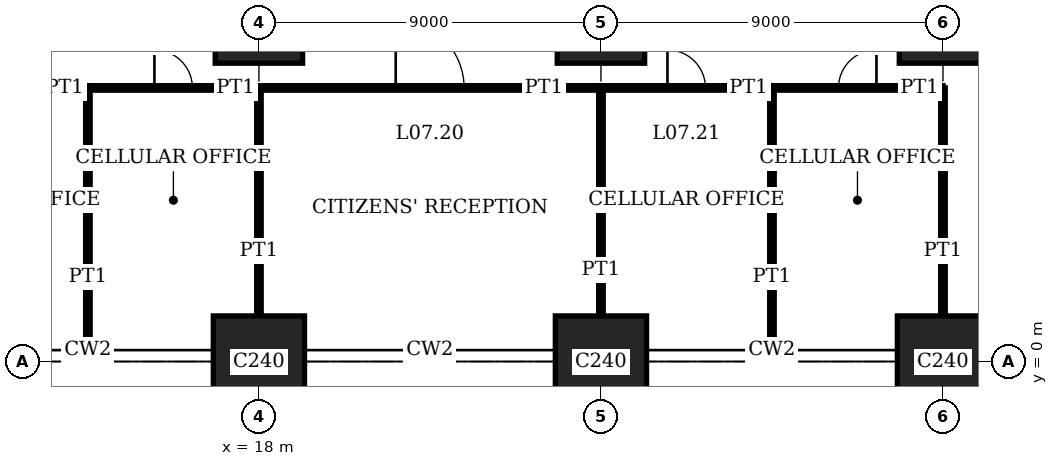
"""IFC4 building model, lengths in metres.
Left out: names, types, materials, properties, quantities, classifications, styles, units other than length and angle.
Written with IfcOpenShell. Run it as: python <this file> out.ifc"""

import sys

from ifc_helpers import new_model, si_unit, direction, frame, frame_2d, origin, origin_2d, place, context, subcontext, project, spatial, rectangle, extrude, element, fill, save


model = new_model("IFC4")
c1 = context("Model", 3, precision=1e-05, world=origin(), true_north=direction((0.0, 1.0)))
c2 = subcontext(c1, "Body", "Model", "MODEL_VIEW")
j1 = project(units=[si_unit("LENGTHUNIT", "METRE"), si_unit("PLANEANGLEUNIT", "RADIAN")], contexts=[c1])
p1 = place(None, origin())
s1 = spatial("IfcSite", under=j1, at=p1, CompositionType="ELEMENT")
p2 = place(p1, origin())
s2 = spatial("IfcBuilding", under=s1, at=p2, CompositionType="ELEMENT")
p3 = place(p2, frame((0.0, 0.0, 31.8)))
s3 = spatial("IfcBuildingStorey", under=s2, at=p3, CompositionType="ELEMENT", Elevation=31.8)
p4 = place(p3, frame((18.0, 0.0, 0.0), z_axis=(0.0, 0.0, 1.0), x_axis=(1.0, 0.0, 0.0)))
e1 = element("IfcColumn", 1, at=p4, inside=s3, PredefinedType="COLUMN", context=c2, shape_type="SweptSolid", body=[
    extrude(rectangle(XDim=2.4, YDim=2.4, at=origin_2d()), origin(), (0.0, 0.0, 1.0), 4.0),
])
p5 = place(p3, frame((18.0, 9.0, 0.0), z_axis=(0.0, 0.0, 1.0), x_axis=(1.0, 0.0, 0.0)))
e2 = element("IfcColumn", 2, at=p5, inside=s3, PredefinedType="COLUMN", context=c2, shape_type="SweptSolid", body=[
    extrude(rectangle(XDim=2.3, YDim=2.3, at=origin_2d()), origin(), (0.0, 0.0, 1.0), 4.0),
])
p6 = place(p3, frame((27.0, 0.0, 0.0), z_axis=(0.0, 0.0, 1.0), x_axis=(1.0, 0.0, 0.0)))
e3 = element("IfcColumn", 3, at=p6, inside=s3, PredefinedType="COLUMN", context=c2, shape_type="SweptSolid", body=[
    extrude(rectangle(XDim=2.4, YDim=2.4, at=origin_2d()), origin(), (0.0, 0.0, 1.0), 4.0),
])
p7 = place(p3, frame((27.0, 9.0, 0.0), z_axis=(0.0, 0.0, 1.0), x_axis=(1.0, 0.0, 0.0)))
e4 = element("IfcColumn", 4, at=p7, inside=s3, PredefinedType="COLUMN", context=c2, shape_type="SweptSolid", body=[
    extrude(rectangle(XDim=2.3, YDim=2.3, at=origin_2d()), origin(), (0.0, 0.0, 1.0), 4.0),
])
p8 = place(p3, frame((36.0, 0.0, 0.0), z_axis=(0.0, 0.0, 1.0), x_axis=(1.0, 0.0, 0.0)))
e5 = element("IfcColumn", 5, at=p8, inside=s3, PredefinedType="COLUMN", context=c2, shape_type="SweptSolid", body=[
    extrude(rectangle(XDim=2.4, YDim=2.4, at=origin_2d()), origin(), (0.0, 0.0, 1.0), 4.0),
])
p9 = place(p3, frame((36.0, 9.0, 0.0), z_axis=(0.0, 0.0, 1.0), x_axis=(1.0, 0.0, 0.0)))
e6 = element("IfcColumn", 6, at=p9, inside=s3, PredefinedType="COLUMN", context=c2, shape_type="SweptSolid", body=[
    extrude(rectangle(XDim=2.3, YDim=2.3, at=origin_2d()), origin(), (0.0, 0.0, 1.0), 4.0),
])
p10 = place(p3, frame((9.0, 7.2, 0.0), z_axis=(0.0, 0.0, 1.0), x_axis=(1.0, 0.0, 0.0)))
e7 = element("IfcWall", 7, at=p10, inside=s3, PredefinedType="PARTITIONING", context=c2, shape_type="SweptSolid", body=[
    extrude(rectangle(XDim=4.5, YDim=0.12, at=frame_2d((2.25, 0.0))), origin(), (0.0, 0.0, 1.0), 3.75),
])
p11 = place(p10, frame((1.75, 0.0, 0.0)))
e8 = element("IfcOpeningElement", 8, at=p11, cuts=e7, PredefinedType="OPENING", context=c2, shape_type="SweptSolid", body=[
    extrude(rectangle(XDim=1.0, YDim=2.4, at=frame_2d((0.5, 1.2))), frame((0.0, 0.07, 0.0), z_axis=(0.0, -1.0, 0.0), x_axis=(1.0, 0.0, 0.0)), (0.0, 0.0, 1.0), 0.14),
])
p12 = place(p3, frame((13.5, 7.2, 0.0), z_axis=(0.0, 0.0, 1.0), x_axis=(1.0, 0.0, 0.0)))
e9 = element("IfcWall", 9, at=p12, inside=s3, PredefinedType="PARTITIONING", context=c2, shape_type="SweptSolid", body=[
    extrude(rectangle(XDim=4.5, YDim=0.12, at=frame_2d((2.25, 0.0))), origin(), (0.0, 0.0, 1.0), 3.75),
])
p13 = place(p12, frame((1.75, 0.0, 0.0)))
e10 = element("IfcOpeningElement", 10, at=p13, cuts=e9, PredefinedType="OPENING", context=c2, shape_type="SweptSolid", body=[
    extrude(rectangle(XDim=1.0, YDim=2.4, at=frame_2d((0.5, 1.2))), frame((0.0, 0.07, 0.0), z_axis=(0.0, -1.0, 0.0), x_axis=(1.0, 0.0, 0.0)), (0.0, 0.0, 1.0), 0.14),
])
p14 = place(p3, frame((18.0, 7.2, 0.0), z_axis=(0.0, 0.0, 1.0), x_axis=(1.0, 0.0, 0.0)))
e11 = element("IfcWall", 11, at=p14, inside=s3, PredefinedType="PARTITIONING", context=c2, shape_type="SweptSolid", body=[
    extrude(rectangle(XDim=9.0, YDim=0.12, at=frame_2d((4.5, 0.0))), origin(), (0.0, 0.0, 1.0), 3.75),
])
p15 = place(p14, frame((3.6, 0.0, 0.0)))
e12 = element("IfcOpeningElement", 12, at=p15, cuts=e11, PredefinedType="OPENING", context=c2, shape_type="SweptSolid", body=[
    extrude(rectangle(XDim=1.8, YDim=2.4, at=frame_2d((0.9, 1.2))), frame((0.0, 0.07, 0.0), z_axis=(0.0, -1.0, 0.0), x_axis=(1.0, 0.0, 0.0)), (0.0, 0.0, 1.0), 0.14),
])
p16 = place(p3, frame((27.0, 7.2, 0.0), z_axis=(0.0, 0.0, 1.0), x_axis=(1.0, 0.0, 0.0)))
e13 = element("IfcWall", 13, at=p16, inside=s3, PredefinedType="PARTITIONING", context=c2, shape_type="SweptSolid", body=[
    extrude(rectangle(XDim=4.5, YDim=0.12, at=frame_2d((2.25, 0.0))), origin(), (0.0, 0.0, 1.0), 3.75),
])
p17 = place(p16, frame((1.75, 0.0, 0.0)))
e14 = element("IfcOpeningElement", 14, at=p17, cuts=e13, PredefinedType="OPENING", context=c2, shape_type="SweptSolid", body=[
    extrude(rectangle(XDim=1.0, YDim=2.4, at=frame_2d((0.5, 1.2))), frame((0.0, 0.07, 0.0), z_axis=(0.0, -1.0, 0.0), x_axis=(1.0, 0.0, 0.0)), (0.0, 0.0, 1.0), 0.14),
])
p18 = place(p3, frame((31.5, 7.2, 0.0), z_axis=(0.0, 0.0, 1.0), x_axis=(1.0, 0.0, 0.0)))
e15 = element("IfcWall", 15, at=p18, inside=s3, PredefinedType="PARTITIONING", context=c2, shape_type="SweptSolid", body=[
    extrude(rectangle(XDim=4.5, YDim=0.12, at=frame_2d((2.25, 0.0))), origin(), (0.0, 0.0, 1.0), 3.75),
])
p19 = place(p18, frame((1.75, 0.0, 0.0)))
e16 = element("IfcOpeningElement", 16, at=p19, cuts=e15, PredefinedType="OPENING", context=c2, shape_type="SweptSolid", body=[
    extrude(rectangle(XDim=1.0, YDim=2.4, at=frame_2d((0.5, 1.2))), frame((0.0, 0.07, 0.0), z_axis=(0.0, -1.0, 0.0), x_axis=(1.0, 0.0, 0.0)), (0.0, 0.0, 1.0), 0.14),
])
p20 = place(p3, frame((13.5, 0.31, 0.0), z_axis=(0.0, 0.0, 1.0), x_axis=(0.0, 1.0, 0.0)))
e17 = element("IfcWall", 17, at=p20, inside=s3, PredefinedType="PARTITIONING", context=c2, shape_type="SweptSolid", body=[
    extrude(rectangle(XDim=6.89, YDim=0.12, at=frame_2d((3.445, 0.0))), origin(), (0.0, 0.0, 1.0), 3.75),
])
for number, where, z_axis, x_axis in (
    (18, (18.0, 1.2, 0.0), (0.0, 0.0, 1.0), (0.0, 1.0, 0.0)),
    (19, (27.0, 1.2, 0.0), (0.0, 0.0, 1.0), (0.0, 1.0, 0.0)),
):
    element("IfcWall", number, at=place(p3, frame(where, z_axis=z_axis, x_axis=x_axis)), inside=s3, PredefinedType="PARTITIONING", context=c2, shape_type="SweptSolid", body=[
        extrude(rectangle(XDim=6.0, YDim=0.12, at=frame_2d((3.0, 0.0))), origin(), (0.0, 0.0, 1.0), 3.05),
    ])
p21 = place(p3, frame((31.5, 0.31, 0.0), z_axis=(0.0, 0.0, 1.0), x_axis=(0.0, 1.0, 0.0)))
e20 = element("IfcWall", 20, at=p21, inside=s3, PredefinedType="PARTITIONING", context=c2, shape_type="SweptSolid", body=[
    extrude(rectangle(XDim=6.89, YDim=0.12, at=frame_2d((3.445, 0.0))), origin(), (0.0, 0.0, 1.0), 3.75),
])
p22 = place(p3, frame((36.0, 1.2, 0.0), z_axis=(0.0, 0.0, 1.0), x_axis=(0.0, 1.0, 0.0)))
e21 = element("IfcWall", 21, at=p22, inside=s3, PredefinedType="PARTITIONING", context=c2, shape_type="SweptSolid", body=[
    extrude(rectangle(XDim=6.0, YDim=0.12, at=frame_2d((3.0, 0.0))), origin(), (0.0, 0.0, 1.0), 3.05),
])
p23 = place(p13, origin())
e22 = element("IfcDoor", 22, at=p23, inside=s3, OperationType="SINGLE_SWING_RIGHT", PredefinedType="DOOR", context=c2, shape_type="SweptSolid", body=[
    extrude(rectangle(XDim=1.0, YDim=2.4, at=frame_2d((0.5, 1.2))), frame((0.0, 0.025, 0.0), z_axis=(0.0, -1.0, 0.0), x_axis=(1.0, 0.0, 0.0)), (0.0, 0.0, 1.0), 0.05),
])
fill(e10, e22)
p24 = place(p15, origin())
e23 = element("IfcDoor", 23, at=p24, inside=s3, OperationType="DOUBLE_DOOR_SINGLE_SWING", PredefinedType="DOOR", context=c2, shape_type="SweptSolid", body=[
    extrude(rectangle(XDim=1.8, YDim=2.4, at=frame_2d((0.9, 1.2))), frame((0.0, 0.025, 0.0), z_axis=(0.0, -1.0, 0.0), x_axis=(1.0, 0.0, 0.0)), (0.0, 0.0, 1.0), 0.05),
])
fill(e12, e23)
p25 = place(p17, origin())
e24 = element("IfcDoor", 24, at=p25, inside=s3, OperationType="SINGLE_SWING_RIGHT", PredefinedType="DOOR", context=c2, shape_type="SweptSolid", body=[
    extrude(rectangle(XDim=1.0, YDim=2.4, at=frame_2d((0.5, 1.2))), frame((0.0, 0.025, 0.0), z_axis=(0.0, -1.0, 0.0), x_axis=(1.0, 0.0, 0.0)), (0.0, 0.0, 1.0), 0.05),
])
fill(e14, e24)
p26 = place(p19, origin())
e25 = element("IfcDoor", 25, at=p26, inside=s3, OperationType="SINGLE_SWING_LEFT", PredefinedType="DOOR", context=c2, shape_type="SweptSolid", body=[
    extrude(rectangle(XDim=1.0, YDim=2.4, at=frame_2d((0.5, 1.2))), frame((0.0, 0.025, 0.0), z_axis=(0.0, -1.0, 0.0), x_axis=(1.0, 0.0, 0.0)), (0.0, 0.0, 1.0), 0.05),
])
fill(e16, e25)
save(model, sys.argv[1])
